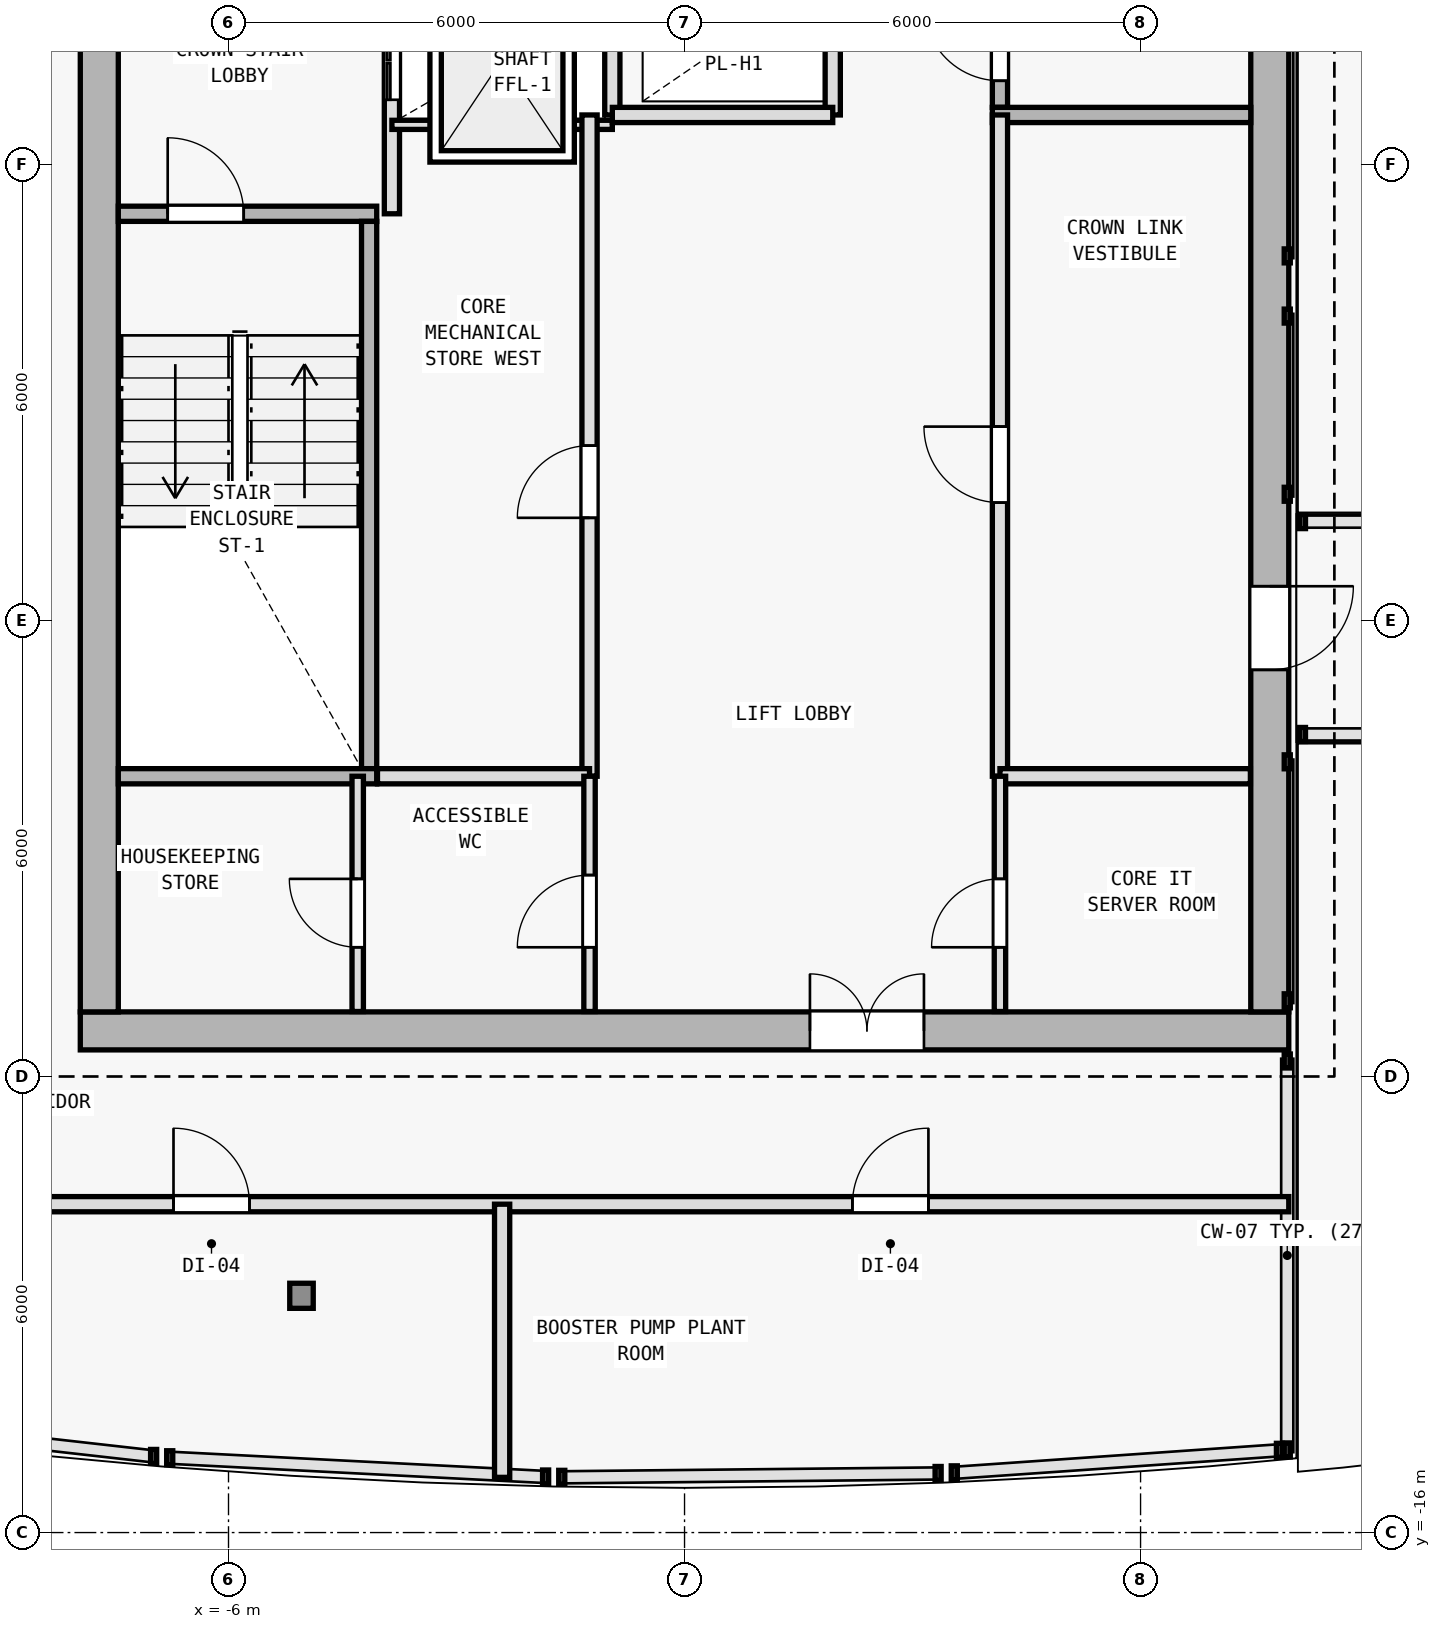
"""IFC4 building model, lengths in metres.
Left out: names, types, materials, properties, quantities, classifications, styles, units other than length and angle.
Written with IfcOpenShell. Run it as: python <this file> out.ifc"""

import sys

from ifc_helpers import new_model, si_unit, direction, frame, frame_2d, origin, origin_2d, place, context, subcontext, project, spatial, rectangle, i_section, extrude, element, fill, save


model = new_model("IFC4")
c1 = context("Model", 3, precision=1e-05, world=origin(), true_north=direction((0.0, 1.0)))
c2 = subcontext(c1, "Body", "Model", "MODEL_VIEW")
j1 = project(units=[si_unit("LENGTHUNIT", "METRE"), si_unit("PLANEANGLEUNIT", "RADIAN")], contexts=[c1])
p1 = place(None, origin())
s1 = spatial("IfcSite", under=j1, at=p1, CompositionType="ELEMENT")
p2 = place(p1, origin())
s2 = spatial("IfcBuilding", under=s1, at=p2, CompositionType="ELEMENT")
p3 = place(p2, frame((0.0, 0.0, 297.6)))
s3 = spatial("IfcBuildingStorey", under=s2, at=p3, CompositionType="ELEMENT", Elevation=297.6)
for number, where, z_axis, x_axis in (
    (1, (-7.7, -9.4, 0.0), (0.0, 0.0, 1.0), (1.0, 0.0, 0.0)),
    (2, (7.7, -9.4, 0.0), (0.0, 0.0, 1.0), (1.0, 0.0, 0.0)),
    (3, (0.0, -9.4, 0.0), (0.0, 0.0, 1.0), (1.0, 0.0, 0.0)),
    (4, (7.7, 0.4, 0.0), (0.0, 0.0, 1.0), (1.0, 0.0, 0.0)),
    (5, (-7.7, 2.0, 0.0), (0.0, 0.0, 1.0), (1.0, 0.0, 0.0)),
):
    element("IfcColumn", number, at=place(p3, frame(where, z_axis=z_axis, x_axis=x_axis)), inside=s3, PredefinedType="COLUMN", context=c2, shape_type="SweptSolid", body=[
        extrude(i_section(OverallWidth=0.374, OverallDepth=0.372, WebThickness=0.012, FlangeThickness=0.02, FilletRadius=0.015, at=origin_2d()), origin(), (0.0, 0.0, 1.0), 3.6),
    ])
p4 = place(p3, frame((-5.04, -12.885, 0.0), z_axis=(0.0, 0.0, 1.0), x_axis=(1.0, 0.0, 0.0)))
e6 = element("IfcColumn", 6, at=p4, inside=s3, PredefinedType="COLUMN", context=c2, shape_type="SweptSolid", body=[
    extrude(i_section(OverallWidth=0.309, OverallDepth=0.33, WebThickness=0.011, FlangeThickness=0.019, FilletRadius=0.027, at=origin_2d()), origin(), (0.0, 0.0, 1.0), 3.6),
])
p5 = place(p3, frame((-7.95, -9.4, 0.0), z_axis=(0.0, 0.0, 1.0), x_axis=(1.0, 0.0, 0.0)))
e7 = element("IfcWall", 7, at=p5, inside=s3, PredefinedType="SHEAR", context=c2, shape_type="SweptSolid", body=[
    extrude(rectangle(XDim=15.9, YDim=0.5, at=frame_2d((7.95, 0.0))), origin(), (0.0, 0.0, 1.0), 3.34),
])
p6 = place(p5, frame((9.6, 0.0, 0.0)))
e8 = element("IfcOpeningElement", 8, at=p6, cuts=e7, PredefinedType="OPENING", context=c2, shape_type="SweptSolid", body=[
    extrude(rectangle(XDim=1.5, YDim=2.2, at=frame_2d((0.75, 1.1))), frame((0.0, 0.26, 0.0), z_axis=(0.0, -1.0, 0.0), x_axis=(1.0, 0.0, 0.0)), (0.0, 0.0, 1.0), 0.52),
])
p7 = place(p3, frame((-7.7, -9.15, 0.0), z_axis=(0.0, 0.0, 1.0), x_axis=(0.0, 1.0, 0.0)))
e9 = element("IfcWall", 9, at=p7, inside=s3, PredefinedType="SHEAR", context=c2, shape_type="SweptSolid", body=[
    extrude(rectangle(XDim=19.1, YDim=0.5, at=frame_2d((9.55, 0.0))), origin(), (0.0, 0.0, 1.0), 3.34),
])
p8 = place(p7, frame((12.7, 0.0, 0.0)))
e10 = element("IfcOpeningElement", 10, at=p8, cuts=e9, PredefinedType="OPENING", context=c2, shape_type="SweptSolid", body=[
    extrude(rectangle(XDim=1.1, YDim=2.15, at=frame_2d((0.55, 1.075))), frame((0.0, 0.26, 0.0), z_axis=(0.0, -1.0, 0.0), x_axis=(1.0, 0.0, 0.0)), (0.0, 0.0, 1.0), 0.52),
])
p9 = place(p3, frame((7.7, 9.95, 0.0), z_axis=(0.0, 0.0, 1.0), x_axis=(0.0, -1.0, 0.0)))
e11 = element("IfcWall", 11, at=p9, inside=s3, PredefinedType="SHEAR", context=c2, shape_type="SweptSolid", body=[
    extrude(rectangle(XDim=19.1, YDim=0.5, at=frame_2d((9.55, 0.0))), origin(), (0.0, 0.0, 1.0), 3.34),
])
p10 = place(p9, frame((13.5, 0.0, 0.0)))
e12 = element("IfcOpeningElement", 12, at=p10, cuts=e11, PredefinedType="OPENING", context=c2, shape_type="SweptSolid", body=[
    extrude(rectangle(XDim=1.1, YDim=2.15, at=frame_2d((0.55, 1.075))), frame((0.0, 0.26, 0.0), z_axis=(0.0, -1.0, 0.0), x_axis=(1.0, 0.0, 0.0)), (0.0, 0.0, 1.0), 0.52),
])
p11 = place(p3, frame((-7.45, 1.35, 0.0), z_axis=(0.0, 0.0, 1.0), x_axis=(1.0, 0.0, 0.0)))
e13 = element("IfcWall", 13, at=p11, inside=s3, PredefinedType="SOLIDWALL", context=c2, shape_type="SweptSolid", body=[
    extrude(rectangle(XDim=3.4, YDim=0.2, at=frame_2d((1.7, 0.0))), origin(), (0.0, 0.0, 1.0), 3.34),
])
p12 = place(p11, frame((0.65, 0.0, 0.0)))
e14 = element("IfcOpeningElement", 14, at=p12, cuts=e13, PredefinedType="OPENING", context=c2, shape_type="SweptSolid", body=[
    extrude(rectangle(XDim=1.0, YDim=2.15, at=frame_2d((0.5, 1.075))), frame((0.0, 0.11, 0.0), z_axis=(0.0, -1.0, 0.0), x_axis=(1.0, 0.0, 0.0)), (0.0, 0.0, 1.0), 0.22),
])
p13 = place(p3, frame((-4.15, -5.95, 0.0), z_axis=(0.0, 0.0, 1.0), x_axis=(0.0, 1.0, 0.0)))
e15 = element("IfcWall", 15, at=p13, inside=s3, PredefinedType="SOLIDWALL", context=c2, shape_type="SweptSolid", body=[
    extrude(rectangle(XDim=7.2, YDim=0.2, at=frame_2d((3.6, 0.0))), origin(), (0.0, 0.0, 1.0), 3.34),
])
p14 = place(p3, frame((-3.85, 1.35, 0.0), z_axis=(0.0, 0.0, 1.0), x_axis=(0.0, 1.0, 0.0)))
e16 = element("IfcWall", 16, at=p14, inside=s3, PredefinedType="SOLIDWALL", context=c2, shape_type="SweptSolid", body=[
    extrude(rectangle(XDim=8.595, YDim=0.2, at=frame_2d((4.297, 0.0))), origin(), (0.0, 0.0, 1.0), 3.34),
])
p15 = place(p14, frame((1.5, 0.0, 0.0)))
e17 = element("IfcOpeningElement", 17, at=p15, cuts=e16, PredefinedType="OPENING", context=c2, shape_type="SweptSolid", body=[
    extrude(rectangle(XDim=1.0, YDim=2.15, at=frame_2d((0.5, 1.075))), frame((0.0, 0.11, 0.0), z_axis=(0.0, -1.0, 0.0), x_axis=(1.0, 0.0, 0.0)), (0.0, 0.0, 1.0), 0.22),
])
p16 = place(p14, frame((3.18, 0.0, 0.0)))
e18 = element("IfcOpeningElement", 18, at=p16, cuts=e16, PredefinedType="OPENING", context=c2, shape_type="SweptSolid", body=[
    extrude(rectangle(XDim=1.0, YDim=2.15, at=frame_2d((0.5, 1.075))), frame((0.0, 0.11, 0.0), z_axis=(0.0, -1.0, 0.0), x_axis=(1.0, 0.0, 0.0)), (0.0, 0.0, 1.0), 0.22),
])
p17 = place(p3, frame((4.15, 2.75, 0.0), z_axis=(0.0, 0.0, 1.0), x_axis=(0.0, 1.0, 0.0)))
e19 = element("IfcWall", 19, at=p17, inside=s3, PredefinedType="SOLIDWALL", context=c2, shape_type="SweptSolid", body=[
    extrude(rectangle(XDim=7.2, YDim=0.2, at=frame_2d((3.6, 0.0))), origin(), (0.0, 0.0, 1.0), 3.34),
])
p18 = place(p17, frame((0.35, 0.0, 0.0)))
e20 = element("IfcOpeningElement", 20, at=p18, cuts=e19, PredefinedType="OPENING", context=c2, shape_type="SweptSolid", body=[
    extrude(rectangle(XDim=1.0, YDim=2.15, at=frame_2d((0.5, 1.075))), frame((0.0, 0.11, 0.0), z_axis=(0.0, -1.0, 0.0), x_axis=(1.0, 0.0, 0.0)), (0.0, 0.0, 1.0), 0.22),
])
p19 = place(p3, frame((4.05, 2.65, 0.0), z_axis=(0.0, 0.0, 1.0), x_axis=(1.0, 0.0, 0.0)))
e21 = element("IfcWall", 21, at=p19, inside=s3, PredefinedType="SOLIDWALL", context=c2, shape_type="SweptSolid", body=[
    extrude(rectangle(XDim=3.4, YDim=0.2, at=frame_2d((1.7, 0.0))), origin(), (0.0, 0.0, 1.0), 3.34),
])
p20 = place(p3, frame((-0.95, 2.65, 0.0), z_axis=(0.0, 0.0, 1.0), x_axis=(0.0, 1.0, 0.0)))
e22 = element("IfcWall", 22, at=p20, inside=s3, PredefinedType="SOLIDWALL", context=c2, shape_type="SweptSolid", body=[
    extrude(rectangle(XDim=3.27, YDim=0.2, at=frame_2d((1.635, 0.0))), origin(), (0.0, 0.0, 1.0), 3.34),
])
p21 = place(p3, frame((-3.85, 2.52, 0.0), z_axis=(0.0, 0.0, 1.0), x_axis=(1.0, 0.0, 0.0)))
e23 = element("IfcWall", 23, at=p21, inside=s3, PredefinedType="PARTITIONING", context=c2, shape_type="SweptSolid", body=[
    extrude(rectangle(XDim=2.9, YDim=0.12, at=frame_2d((1.45, 0.0))), origin(), (0.0, 0.0, 1.0), 3.34),
])
p22 = place(p3, frame((4.15, -6.05, 0.0), z_axis=(0.0, 0.0, 1.0), x_axis=(0.0, 1.0, 0.0)))
e24 = element("IfcWall", 24, at=p22, inside=s3, PredefinedType="SOLIDWALL", context=c2, shape_type="SweptSolid", body=[
    extrude(rectangle(XDim=8.7, YDim=0.2, at=frame_2d((4.35, 0.0))), origin(), (0.0, 0.0, 1.0), 3.34),
])
p23 = place(p22, frame((3.6, 0.0, 0.0)))
e25 = element("IfcOpeningElement", 25, at=p23, cuts=e24, PredefinedType="OPENING", context=c2, shape_type="SweptSolid", body=[
    extrude(rectangle(XDim=1.0, YDim=2.15, at=frame_2d((0.5, 1.075))), frame((0.0, 0.11, 0.0), z_axis=(0.0, -1.0, 0.0), x_axis=(1.0, 0.0, 0.0)), (0.0, 0.0, 1.0), 0.22),
])
p24 = place(p3, frame((-1.25, -6.05, 0.0), z_axis=(0.0, 0.0, 1.0), x_axis=(0.0, 1.0, 0.0)))
e26 = element("IfcWall", 26, at=p24, inside=s3, PredefinedType="SOLIDWALL", context=c2, shape_type="SweptSolid", body=[
    extrude(rectangle(XDim=8.7, YDim=0.2, at=frame_2d((4.35, 0.0))), origin(), (0.0, 0.0, 1.0), 3.34),
])
p25 = place(p24, frame((3.4, 0.0, 0.0)))
e27 = element("IfcOpeningElement", 27, at=p25, cuts=e26, PredefinedType="OPENING", context=c2, shape_type="SweptSolid", body=[
    extrude(rectangle(XDim=0.95, YDim=2.1, at=frame_2d((0.475, 1.05))), frame((0.0, 0.11, 0.0), z_axis=(0.0, -1.0, 0.0), x_axis=(1.0, 0.0, 0.0)), (0.0, 0.0, 1.0), 0.22),
])
p26 = place(p3, frame((1.95, 2.65, 0.0), z_axis=(0.0, 0.0, 1.0), x_axis=(0.0, 1.0, 0.0)))
e28 = element("IfcWall", 28, at=p26, inside=s3, PredefinedType="SOLIDWALL", context=c2, shape_type="SweptSolid", body=[
    extrude(rectangle(XDim=7.295, YDim=0.2, at=frame_2d((3.647, 0.0))), origin(), (0.0, 0.0, 1.0), 3.34),
])
p27 = place(p3, frame((-0.95, 2.65, 0.0), z_axis=(0.0, 0.0, 1.0), x_axis=(1.0, 0.0, 0.0)))
e29 = element("IfcWall", 29, at=p27, inside=s3, PredefinedType="SOLIDWALL", context=c2, shape_type="SweptSolid", body=[
    extrude(rectangle(XDim=2.9, YDim=0.2, at=frame_2d((1.45, 0.0))), origin(), (0.0, 0.0, 1.0), 3.34),
])
p28 = place(p3, frame((-7.45, -6.05, 0.0), z_axis=(0.0, 0.0, 1.0), x_axis=(1.0, 0.0, 0.0)))
e30 = element("IfcWall", 30, at=p28, inside=s3, PredefinedType="SOLIDWALL", context=c2, shape_type="SweptSolid", body=[
    extrude(rectangle(XDim=3.4, YDim=0.2, at=frame_2d((1.7, 0.0))), origin(), (0.0, 0.0, 1.0), 3.34),
])
p29 = place(p3, frame((-4.04, -6.05, 0.0), z_axis=(0.0, 0.0, 1.0), x_axis=(1.0, 0.0, 0.0)))
e31 = element("IfcWall", 31, at=p29, inside=s3, PredefinedType="SOLIDWALL", context=c2, shape_type="SweptSolid", body=[
    extrude(rectangle(XDim=2.79, YDim=0.2, at=frame_2d((1.395, 0.0))), origin(), (0.0, 0.0, 1.0), 3.34),
])
p30 = place(p3, frame((4.15, -6.05, 0.0), z_axis=(0.0, 0.0, 1.0), x_axis=(1.0, 0.0, 0.0)))
e32 = element("IfcWall", 32, at=p30, inside=s3, PredefinedType="SOLIDWALL", context=c2, shape_type="SweptSolid", body=[
    extrude(rectangle(XDim=3.295, YDim=0.2, at=frame_2d((1.647, 0.0))), origin(), (0.0, 0.0, 1.0), 3.34),
])
p31 = place(p3, frame((-1.25, -9.145, 0.0), z_axis=(0.0, 0.0, 1.0), x_axis=(0.0, 1.0, 0.0)))
e33 = element("IfcWall", 33, at=p31, inside=s3, PredefinedType="PARTITIONING", context=c2, shape_type="SweptSolid", body=[
    extrude(rectangle(XDim=3.095, YDim=0.15, at=frame_2d((1.547, 0.0))), origin(), (0.0, 0.0, 1.0), 3.34),
])
p32 = place(p31, frame((0.845, 0.0, 0.0)))
e34 = element("IfcOpeningElement", 34, at=p32, cuts=e33, PredefinedType="OPENING", context=c2, shape_type="SweptSolid", body=[
    extrude(rectangle(XDim=0.95, YDim=2.1, at=frame_2d((0.475, 1.05))), frame((0.0, 0.085, 0.0), z_axis=(0.0, -1.0, 0.0), x_axis=(1.0, 0.0, 0.0)), (0.0, 0.0, 1.0), 0.17),
])
p33 = place(p3, frame((4.15, -9.145, 0.0), z_axis=(0.0, 0.0, 1.0), x_axis=(0.0, 1.0, 0.0)))
e35 = element("IfcWall", 35, at=p33, inside=s3, PredefinedType="PARTITIONING", context=c2, shape_type="SweptSolid", body=[
    extrude(rectangle(XDim=3.095, YDim=0.15, at=frame_2d((1.547, 0.0))), origin(), (0.0, 0.0, 1.0), 3.34),
])
p34 = place(p33, frame((0.845, 0.0, 0.0)))
e36 = element("IfcOpeningElement", 36, at=p34, cuts=e35, PredefinedType="OPENING", context=c2, shape_type="SweptSolid", body=[
    extrude(rectangle(XDim=0.9, YDim=2.1, at=frame_2d((0.45, 1.05))), frame((0.0, 0.085, 0.0), z_axis=(0.0, -1.0, 0.0), x_axis=(1.0, 0.0, 0.0)), (0.0, 0.0, 1.0), 0.17),
])
p35 = place(p3, frame((-4.3, -9.145, 0.0), z_axis=(0.0, 0.0, 1.0), x_axis=(0.0, 1.0, 0.0)))
e37 = element("IfcWall", 37, at=p35, inside=s3, PredefinedType="PARTITIONING", context=c2, shape_type="SweptSolid", body=[
    extrude(rectangle(XDim=3.095, YDim=0.15, at=frame_2d((1.547, 0.0))), origin(), (0.0, 0.0, 1.0), 3.34),
])
p36 = place(p35, frame((0.845, 0.0, 0.0)))
e38 = element("IfcOpeningElement", 38, at=p36, cuts=e37, PredefinedType="OPENING", context=c2, shape_type="SweptSolid", body=[
    extrude(rectangle(XDim=0.9, YDim=2.1, at=frame_2d((0.45, 1.05))), frame((0.0, 0.085, 0.0), z_axis=(0.0, -1.0, 0.0), x_axis=(1.0, 0.0, 0.0)), (0.0, 0.0, 1.0), 0.17),
])
p37 = place(p3, frame((-10.18, -11.68, 0.0), z_axis=(0.0, 0.0, 1.0), x_axis=(1.0, 0.0, 0.0)))
e39 = element("IfcWall", 39, at=p37, inside=s3, PredefinedType="SOLIDWALL", context=c2, shape_type="SweptSolid", body=[
    extrude(rectangle(XDim=18.13, YDim=0.2, at=frame_2d((9.065, 0.0))), origin(), (0.0, 0.0, 1.0), 2.995),
])
p38 = place(p37, frame((3.456, 0.0, 0.0)))
e40 = element("IfcOpeningElement", 40, at=p38, cuts=e39, PredefinedType="OPENING", context=c2, shape_type="SweptSolid", body=[
    extrude(rectangle(XDim=1.0, YDim=2.15, at=frame_2d((0.5, 1.075))), frame((0.0, 0.11, 0.0), z_axis=(0.0, -1.0, 0.0), x_axis=(1.0, 0.0, 0.0)), (0.0, 0.0, 1.0), 0.22),
])
p39 = place(p37, frame((12.389, 0.0, 0.0)))
e41 = element("IfcOpeningElement", 41, at=p39, cuts=e39, PredefinedType="OPENING", context=c2, shape_type="SweptSolid", body=[
    extrude(rectangle(XDim=1.0, YDim=2.15, at=frame_2d((0.5, 1.075))), frame((0.0, 0.11, 0.0), z_axis=(0.0, -1.0, 0.0), x_axis=(1.0, 0.0, 0.0)), (0.0, 0.0, 1.0), 0.22),
])
p40 = place(p3, frame((-2.4, -15.274, 0.0), z_axis=(0.0, 0.0, 1.0), x_axis=(0.0, 1.0, 0.0)))
e42 = element("IfcWall", 42, at=p40, inside=s3, PredefinedType="SOLIDWALL", context=c2, shape_type="SweptSolid", body=[
    extrude(rectangle(XDim=3.594, YDim=0.2, at=frame_2d((1.797, 0.0))), origin(), (0.0, 0.0, 1.0), 3.34),
])
p41 = place(p6, origin())
e43 = element("IfcDoor", 43, at=p41, inside=s3, OperationType="DOUBLE_DOOR_SINGLE_SWING", PredefinedType="DOOR", context=c2, shape_type="SweptSolid", body=[
    extrude(rectangle(XDim=1.5, YDim=2.2, at=frame_2d((0.75, 1.1))), frame((0.0, 0.025, 0.0), z_axis=(0.0, -1.0, 0.0), x_axis=(1.0, 0.0, 0.0)), (0.0, 0.0, 1.0), 0.05),
])
fill(e8, e43)
p42 = place(p10, origin())
e44 = element("IfcDoor", 44, at=p42, inside=s3, OperationType="SINGLE_SWING_LEFT", PredefinedType="DOOR", context=c2, shape_type="SweptSolid", body=[
    extrude(rectangle(XDim=1.1, YDim=2.15, at=frame_2d((0.55, 1.075))), frame((0.0, 0.025, 0.0), z_axis=(0.0, -1.0, 0.0), x_axis=(1.0, 0.0, 0.0)), (0.0, 0.0, 1.0), 0.05),
])
fill(e12, e44)
p43 = place(p12, origin())
e45 = element("IfcDoor", 45, at=p43, inside=s3, OperationType="SINGLE_SWING_LEFT", PredefinedType="DOOR", context=c2, shape_type="SweptSolid", body=[
    extrude(rectangle(XDim=1.0, YDim=2.15, at=frame_2d((0.5, 1.075))), frame((0.0, 0.025, 0.0), z_axis=(0.0, -1.0, 0.0), x_axis=(1.0, 0.0, 0.0)), (0.0, 0.0, 1.0), 0.05),
])
fill(e14, e45)
p44 = place(p18, origin())
e46 = element("IfcDoor", 46, at=p44, inside=s3, OperationType="SINGLE_SWING_RIGHT", PredefinedType="DOOR", context=c2, shape_type="SweptSolid", body=[
    extrude(rectangle(XDim=1.0, YDim=2.15, at=frame_2d((0.5, 1.075))), frame((0.0, 0.025, 0.0), z_axis=(0.0, -1.0, 0.0), x_axis=(1.0, 0.0, 0.0)), (0.0, 0.0, 1.0), 0.05),
])
fill(e20, e46)
p45 = place(p23, origin())
e47 = element("IfcDoor", 47, at=p45, inside=s3, OperationType="SINGLE_SWING_RIGHT", PredefinedType="DOOR", context=c2, shape_type="SweptSolid", body=[
    extrude(rectangle(XDim=1.0, YDim=2.15, at=frame_2d((0.5, 1.075))), frame((0.0, 0.025, 0.0), z_axis=(0.0, -1.0, 0.0), x_axis=(1.0, 0.0, 0.0)), (0.0, 0.0, 1.0), 0.05),
])
fill(e25, e47)
p46 = place(p25, origin())
e48 = element("IfcDoor", 48, at=p46, inside=s3, OperationType="SINGLE_SWING_LEFT", PredefinedType="DOOR", context=c2, shape_type="SweptSolid", body=[
    extrude(rectangle(XDim=0.95, YDim=2.1, at=frame_2d((0.475, 1.05))), frame((0.0, 0.025, 0.0), z_axis=(0.0, -1.0, 0.0), x_axis=(1.0, 0.0, 0.0)), (0.0, 0.0, 1.0), 0.05),
])
fill(e27, e48)
p47 = place(p15, origin())
e49 = element("IfcDoor", 49, at=p47, inside=s3, OperationType="DOUBLE_DOOR_SLIDING", PredefinedType="DOOR", context=c2, shape_type="SweptSolid", body=[
    extrude(rectangle(XDim=1.0, YDim=2.15, at=frame_2d((0.5, 1.075))), frame((0.0, 0.025, 0.0), z_axis=(0.0, -1.0, 0.0), x_axis=(1.0, 0.0, 0.0)), (0.0, 0.0, 1.0), 0.05),
])
fill(e17, e49)
p48 = place(p32, origin())
e50 = element("IfcDoor", 50, at=p48, inside=s3, OperationType="SINGLE_SWING_LEFT", PredefinedType="DOOR", context=c2, shape_type="SweptSolid", body=[
    extrude(rectangle(XDim=0.95, YDim=2.1, at=frame_2d((0.475, 1.05))), frame((0.0, 0.025, 0.0), z_axis=(0.0, -1.0, 0.0), x_axis=(1.0, 0.0, 0.0)), (0.0, 0.0, 1.0), 0.05),
])
fill(e34, e50)
p49 = place(p36, origin())
e51 = element("IfcDoor", 51, at=p49, inside=s3, OperationType="SINGLE_SWING_RIGHT", PredefinedType="DOOR", context=c2, shape_type="SweptSolid", body=[
    extrude(rectangle(XDim=0.9, YDim=2.1, at=frame_2d((0.45, 1.05))), frame((0.0, 0.025, 0.0), z_axis=(0.0, -1.0, 0.0), x_axis=(1.0, 0.0, 0.0)), (0.0, 0.0, 1.0), 0.05),
])
fill(e38, e51)
p50 = place(p34, origin())
e52 = element("IfcDoor", 52, at=p50, inside=s3, OperationType="SINGLE_SWING_LEFT", PredefinedType="DOOR", context=c2, shape_type="SweptSolid", body=[
    extrude(rectangle(XDim=0.9, YDim=2.1, at=frame_2d((0.45, 1.05))), frame((0.0, 0.025, 0.0), z_axis=(0.0, -1.0, 0.0), x_axis=(1.0, 0.0, 0.0)), (0.0, 0.0, 1.0), 0.05),
])
fill(e36, e52)
p51 = place(p38, origin())
e53 = element("IfcDoor", 53, at=p51, inside=s3, OperationType="SINGLE_SWING_LEFT", PredefinedType="DOOR", context=c2, shape_type="SweptSolid", body=[
    extrude(rectangle(XDim=1.0, YDim=2.15, at=frame_2d((0.5, 1.075))), frame((0.0, 0.025, 0.0), z_axis=(0.0, -1.0, 0.0), x_axis=(1.0, 0.0, 0.0)), (0.0, 0.0, 1.0), 0.05),
])
fill(e40, e53)
p52 = place(p39, origin())
e54 = element("IfcDoor", 54, at=p52, inside=s3, OperationType="SINGLE_SWING_RIGHT", PredefinedType="DOOR", context=c2, shape_type="SweptSolid", body=[
    extrude(rectangle(XDim=1.0, YDim=2.15, at=frame_2d((0.5, 1.075))), frame((0.0, 0.025, 0.0), z_axis=(0.0, -1.0, 0.0), x_axis=(1.0, 0.0, 0.0)), (0.0, 0.0, 1.0), 0.05),
])
fill(e41, e54)
save(model, sys.argv[1])
